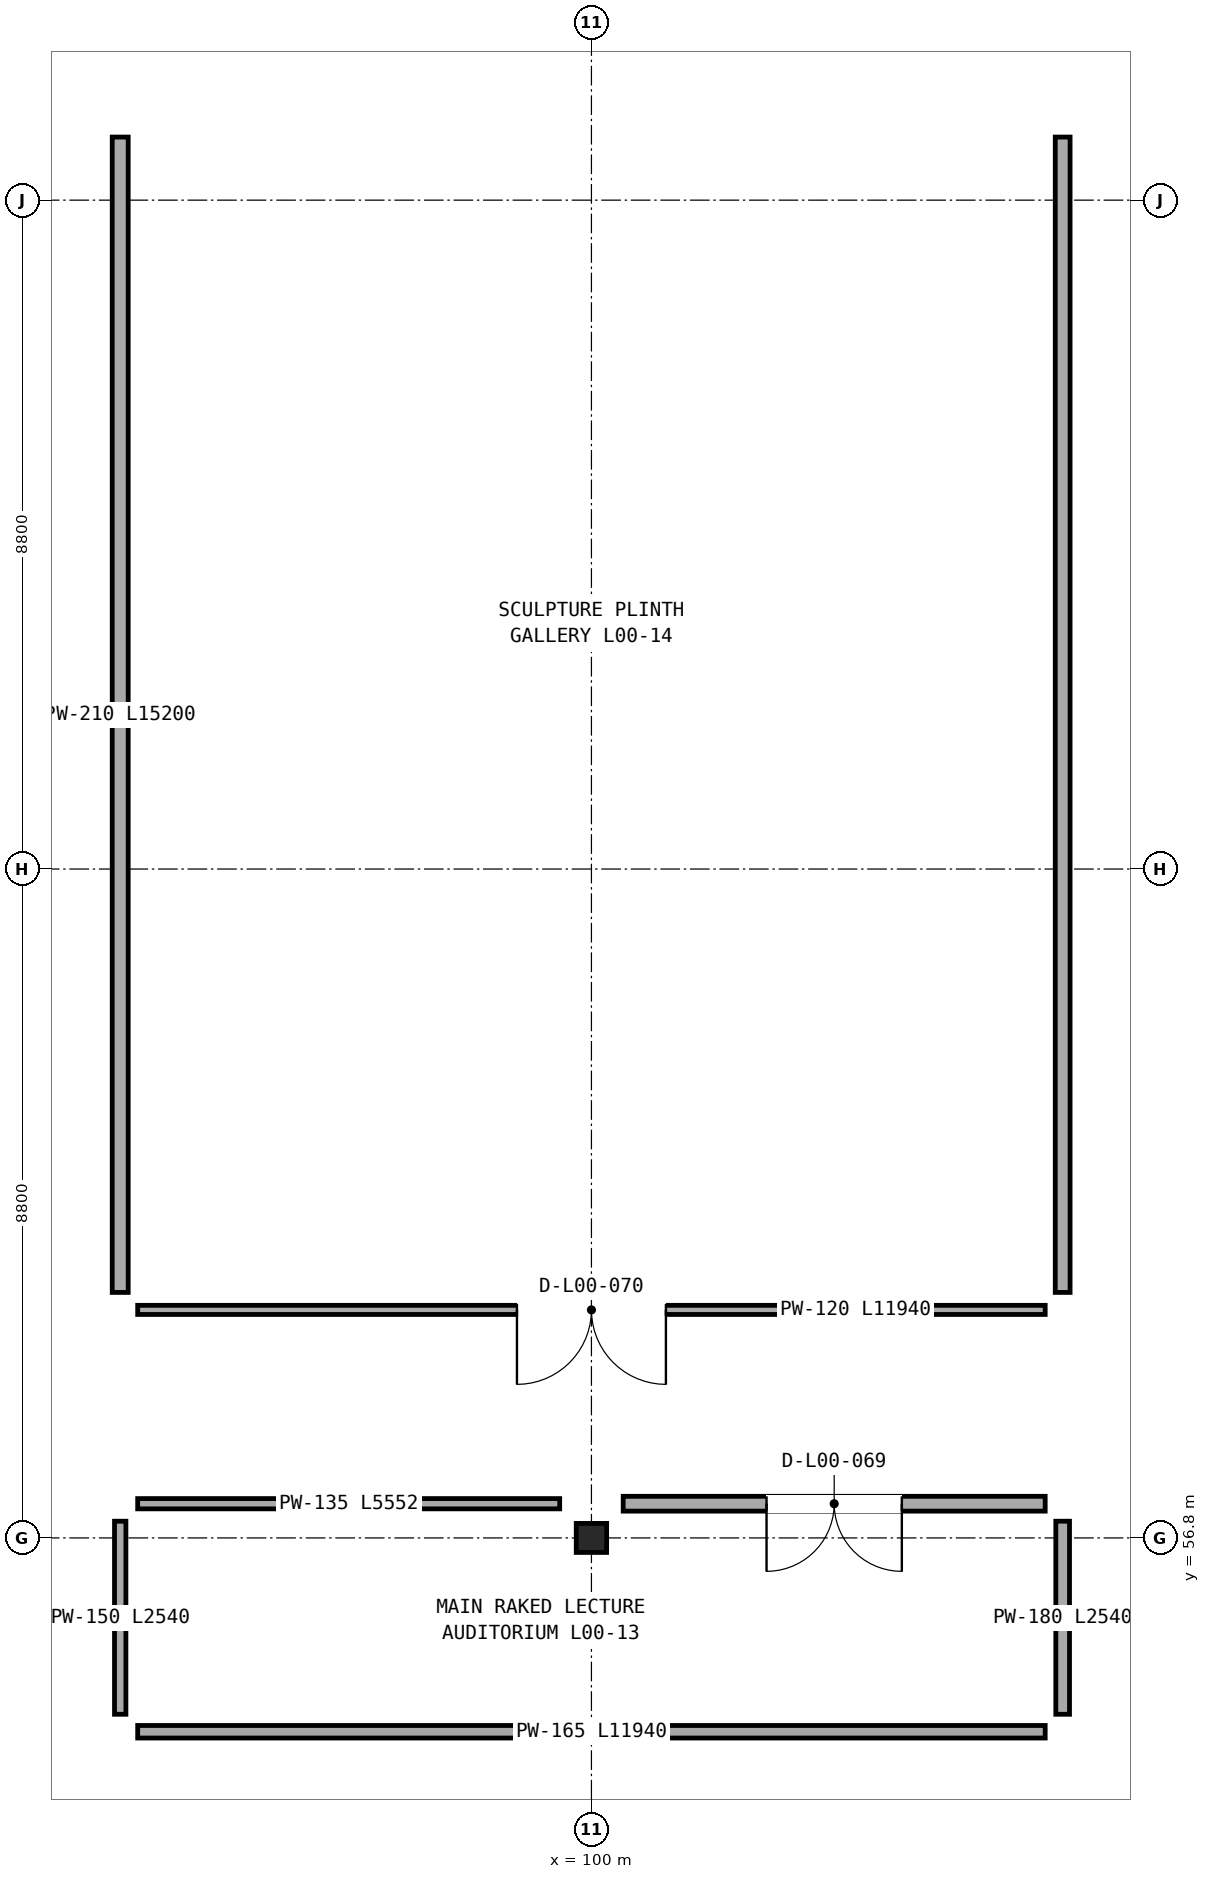
"""IFC4 building model, lengths in metres.
Left out: names, types, materials, properties, quantities, classifications, styles, units other than length and angle.
Written with IfcOpenShell. Run it as: python <this file> out.ifc"""

import sys

from ifc_helpers import new_model, si_unit, direction, frame, frame_2d, origin, origin_2d, place, context, subcontext, project, spatial, rectangle, i_section, extrude, element, fill, save


model = new_model("IFC4")
c1 = context("Model", 3, precision=1e-05, world=origin(), true_north=direction((0.0, 1.0)))
c2 = subcontext(c1, "Body", "Model", "MODEL_VIEW")
j1 = project(units=[si_unit("LENGTHUNIT", "METRE"), si_unit("PLANEANGLEUNIT", "RADIAN")], contexts=[c1])
p1 = place(None, origin())
s1 = spatial("IfcSite", under=j1, at=p1, CompositionType="ELEMENT")
p2 = place(p1, origin())
s2 = spatial("IfcBuilding", under=s1, at=p2, CompositionType="ELEMENT")
p3 = place(p2, origin())
s3 = spatial("IfcBuildingStorey", under=s2, at=p3, CompositionType="ELEMENT", Elevation=0.0)
p4 = place(p3, frame((100.0, 56.8, 0.0), z_axis=(0.0, 0.0, 1.0), x_axis=(1.0, 0.0, 0.0)))
e1 = element("IfcColumn", 1, at=p4, inside=s3, PredefinedType="COLUMN", context=c2, shape_type="SweptSolid", body=[
    extrude(i_section(OverallWidth=0.4, OverallDepth=0.382, WebThickness=0.025, FlangeThickness=0.036, at=origin_2d()), origin(), (0.0, 0.0, 1.0), 5.6),
])
p5 = place(p3, frame((100.418, 57.25, 0.0), z_axis=(0.0, 0.0, 1.0), x_axis=(1.0, 0.0, 0.0)))
e2 = element("IfcWall", 2, at=p5, inside=s3, PredefinedType="PARTITIONING", context=c2, shape_type="SweptSolid", body=[
    extrude(rectangle(XDim=5.552, YDim=0.195, at=frame_2d((2.776, 0.0))), origin(), (0.0, 0.0, 1.0), 5.23),
])
p6 = place(p5, frame((1.886, 0.0, 0.0)))
e3 = element("IfcOpeningElement", 3, at=p6, cuts=e2, PredefinedType="OPENING", context=c2, shape_type="SweptSolid", body=[
    extrude(rectangle(XDim=1.78, YDim=2.46, at=frame_2d((0.89, 1.23))), frame((0.0, 0.107, 0.0), z_axis=(0.0, -1.0, 0.0), x_axis=(1.0, 0.0, 0.0)), (0.0, 0.0, 1.0), 0.215),
])
p7 = place(p3, frame((106.2, 57.02, 0.0), z_axis=(0.0, 0.0, 1.0), x_axis=(0.0, -1.0, 0.0)))
e4 = element("IfcWall", 4, at=p7, inside=s3, PredefinedType="PARTITIONING", context=c2, shape_type="SweptSolid", body=[
    extrude(rectangle(XDim=2.54, YDim=0.18, at=frame_2d((1.27, 0.0))), origin(), (0.0, 0.0, 1.0), 4.708),
])
p8 = place(p3, frame((105.97, 54.25, 0.0), z_axis=(0.0, 0.0, 1.0), x_axis=(-1.0, 0.0, 0.0)))
e5 = element("IfcWall", 5, at=p8, inside=s3, PredefinedType="PARTITIONING", context=c2, shape_type="SweptSolid", body=[
    extrude(rectangle(XDim=11.94, YDim=0.165, at=frame_2d((5.97, 0.0))), origin(), (0.0, 0.0, 1.0), 4.787),
])
p9 = place(p3, frame((93.8, 54.48, 0.0), z_axis=(0.0, 0.0, 1.0), x_axis=(0.0, 1.0, 0.0)))
e6 = element("IfcWall", 6, at=p9, inside=s3, PredefinedType="PARTITIONING", context=c2, shape_type="SweptSolid", body=[
    extrude(rectangle(XDim=2.54, YDim=0.15, at=frame_2d((1.27, 0.0))), origin(), (0.0, 0.0, 1.0), 4.708),
])
p10 = place(p3, frame((94.03, 57.25, 0.0), z_axis=(0.0, 0.0, 1.0), x_axis=(1.0, 0.0, 0.0)))
e7 = element("IfcWall", 7, at=p10, inside=s3, PredefinedType="PARTITIONING", context=c2, shape_type="SweptSolid", body=[
    extrude(rectangle(XDim=5.552, YDim=0.135, at=frame_2d((2.776, 0.0))), origin(), (0.0, 0.0, 1.0), 5.23),
])
p11 = place(p3, frame((105.97, 59.8, 0.0), z_axis=(0.0, 0.0, 1.0), x_axis=(-1.0, 0.0, 0.0)))
e8 = element("IfcWall", 8, at=p11, inside=s3, PredefinedType="PARTITIONING", context=c2, shape_type="SweptSolid", body=[
    extrude(rectangle(XDim=11.94, YDim=0.12, at=frame_2d((5.97, 0.0))), origin(), (0.0, 0.0, 1.0), 5.23),
])
p12 = place(p11, frame((4.99, 0.0, 0.0)))
e9 = element("IfcOpeningElement", 9, at=p12, cuts=e8, PredefinedType="OPENING", context=c2, shape_type="SweptSolid", body=[
    extrude(rectangle(XDim=1.96, YDim=2.46, at=frame_2d((0.98, 1.23))), frame((0.0, 0.07, 0.0), z_axis=(0.0, -1.0, 0.0), x_axis=(1.0, 0.0, 0.0)), (0.0, 0.0, 1.0), 0.14),
])
p13 = place(p3, frame((93.8, 60.03, 0.0), z_axis=(0.0, 0.0, 1.0), x_axis=(0.0, 1.0, 0.0)))
e10 = element("IfcWall", 10, at=p13, inside=s3, PredefinedType="PARTITIONING", context=c2, shape_type="SweptSolid", body=[
    extrude(rectangle(XDim=15.2, YDim=0.21, at=frame_2d((7.6, 0.0))), origin(), (0.0, 0.0, 1.0), 5.23),
])
p14 = place(p3, frame((106.2, 75.23, 0.0), z_axis=(0.0, 0.0, 1.0), x_axis=(0.0, -1.0, 0.0)))
e11 = element("IfcWall", 11, at=p14, inside=s3, PredefinedType="PARTITIONING", context=c2, shape_type="SweptSolid", body=[
    extrude(rectangle(XDim=15.2, YDim=0.195, at=frame_2d((7.6, 0.0))), origin(), (0.0, 0.0, 1.0), 5.23),
])
p15 = place(p6, frame((1.78, 0.0, 0.0), z_axis=(0.0, 0.0, 1.0), x_axis=(-1.0, 0.0, 0.0)))
e12 = element("IfcDoor", 12, at=p15, inside=s3, OperationType="DOUBLE_DOOR_SINGLE_SWING", PredefinedType="DOOR", context=c2, shape_type="SweptSolid", body=[
    extrude(rectangle(XDim=1.78, YDim=2.46, at=frame_2d((0.89, 1.23))), frame((0.0, 0.025, 0.0), z_axis=(0.0, -1.0, 0.0), x_axis=(1.0, 0.0, 0.0)), (0.0, 0.0, 1.0), 0.05),
])
fill(e3, e12)
p16 = place(p12, origin())
e13 = element("IfcDoor", 13, at=p16, inside=s3, OperationType="DOUBLE_DOOR_SINGLE_SWING", PredefinedType="DOOR", context=c2, shape_type="SweptSolid", body=[
    extrude(rectangle(XDim=1.96, YDim=2.46, at=frame_2d((0.98, 1.23))), frame((0.0, 0.025, 0.0), z_axis=(0.0, -1.0, 0.0), x_axis=(1.0, 0.0, 0.0)), (0.0, 0.0, 1.0), 0.05),
])
fill(e9, e13)
save(model, sys.argv[1])
